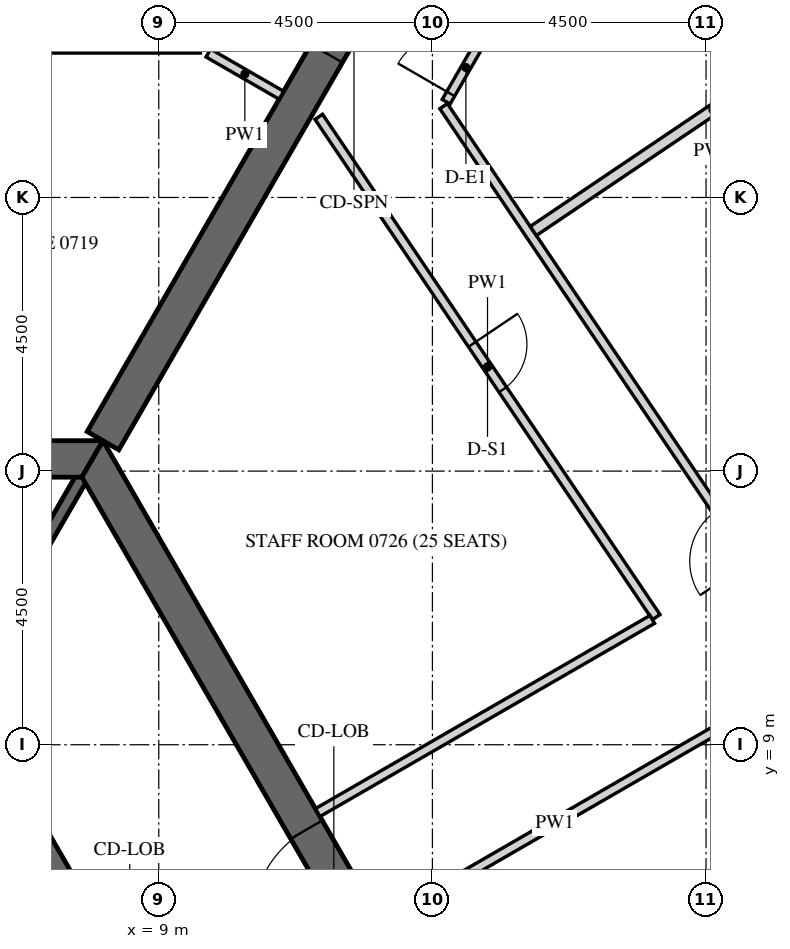
"""IFC4 building model, lengths in metres.
Left out: names, types, materials, properties, quantities, classifications, styles, units other than length and angle.
Written with IfcOpenShell. Run it as: python <this file> out.ifc"""

import sys

from ifc_helpers import new_model, si_unit, direction, frame, frame_2d, origin, place, context, subcontext, project, spatial, polyline, rectangle, outline, extrude, element, fill, save


model = new_model("IFC4")
c1 = context("Model", 3, precision=1e-05, world=origin(), true_north=direction((0.0, 1.0)))
c2 = subcontext(c1, "Body", "Model", "MODEL_VIEW")
j1 = project(units=[si_unit("LENGTHUNIT", "METRE"), si_unit("PLANEANGLEUNIT", "RADIAN")], contexts=[c1])
p1 = place(None, origin())
s1 = spatial("IfcSite", under=j1, at=p1, CompositionType="ELEMENT")
p2 = place(p1, origin())
s2 = spatial("IfcBuilding", under=s1, at=p2, CompositionType="ELEMENT")
p3 = place(p2, frame((0.0, 0.0, 99.9)))
s3 = spatial("IfcBuildingStorey", under=s2, at=p3, CompositionType="ELEMENT", Elevation=99.9)
p4 = place(p3, frame((33.728, 3.153, -0.15), z_axis=(0.0, 0.0, 1.0), x_axis=(-0.559192411416, 0.82903790445, 0.0)))
e1 = element("IfcWall", 1, at=p4, inside=s3, PredefinedType="SOLIDWALL", context=c2, shape_type="SweptSolid", body=[
    extrude(outline(polyline([(-0.026, -0.275), (30.093, -0.275), (30.048, 0.275), (0.026, 0.275), (-0.026, -0.275)])), origin(), (0.0, 0.0, 1.0), 3.9),
])
p5 = place(p4, frame((1.236, 0.0, 1.05)))
e2 = element("IfcOpeningElement", 2, at=p5, cuts=e1, PredefinedType="OPENING", context=c2, shape_type="SweptSolid", body=[
    extrude(rectangle(XDim=2.4, YDim=2.4, at=frame_2d((1.2, 1.2))), frame((0.0, 0.285, 0.0), z_axis=(0.0, -1.0, 0.0), x_axis=(1.0, 0.0, 0.0)), (0.0, 0.0, 1.0), 0.57),
])
p6 = place(p4, frame((4.835, 0.0, 1.05)))
e3 = element("IfcOpeningElement", 3, at=p6, cuts=e1, PredefinedType="OPENING", context=c2, shape_type="SweptSolid", body=[
    extrude(rectangle(XDim=2.4, YDim=2.4, at=frame_2d((1.2, 1.2))), frame((0.0, 0.285, 0.0), z_axis=(0.0, -1.0, 0.0), x_axis=(1.0, 0.0, 0.0)), (0.0, 0.0, 1.0), 0.57),
])
p7 = place(p4, frame((8.436, 0.0, 1.05)))
e4 = element("IfcOpeningElement", 4, at=p7, cuts=e1, PredefinedType="OPENING", context=c2, shape_type="SweptSolid", body=[
    extrude(rectangle(XDim=2.4, YDim=2.4, at=frame_2d((1.2, 1.2))), frame((0.0, 0.285, 0.0), z_axis=(0.0, -1.0, 0.0), x_axis=(1.0, 0.0, 0.0)), (0.0, 0.0, 1.0), 0.57),
])
p8 = place(p4, frame((12.035, 0.0, 1.05)))
e5 = element("IfcOpeningElement", 5, at=p8, cuts=e1, PredefinedType="OPENING", context=c2, shape_type="SweptSolid", body=[
    extrude(rectangle(XDim=2.4, YDim=2.4, at=frame_2d((1.2, 1.2))), frame((0.0, 0.285, 0.0), z_axis=(0.0, -1.0, 0.0), x_axis=(1.0, 0.0, 0.0)), (0.0, 0.0, 1.0), 0.57),
])
p9 = place(p4, frame((15.635, 0.0, 1.05)))
e6 = element("IfcOpeningElement", 6, at=p9, cuts=e1, PredefinedType="OPENING", context=c2, shape_type="SweptSolid", body=[
    extrude(rectangle(XDim=2.4, YDim=2.4, at=frame_2d((1.2, 1.2))), frame((0.0, 0.285, 0.0), z_axis=(0.0, -1.0, 0.0), x_axis=(1.0, 0.0, 0.0)), (0.0, 0.0, 1.0), 0.57),
])
p10 = place(p4, frame((19.236, 0.0, 1.05)))
e7 = element("IfcOpeningElement", 7, at=p10, cuts=e1, PredefinedType="OPENING", context=c2, shape_type="SweptSolid", body=[
    extrude(rectangle(XDim=2.4, YDim=2.4, at=frame_2d((1.2, 1.2))), frame((0.0, 0.285, 0.0), z_axis=(0.0, -1.0, 0.0), x_axis=(1.0, 0.0, 0.0)), (0.0, 0.0, 1.0), 0.57),
])
p11 = place(p4, frame((22.835, 0.0, 1.05)))
e8 = element("IfcOpeningElement", 8, at=p11, cuts=e1, PredefinedType="OPENING", context=c2, shape_type="SweptSolid", body=[
    extrude(rectangle(XDim=2.4, YDim=2.4, at=frame_2d((1.2, 1.2))), frame((0.0, 0.285, 0.0), z_axis=(0.0, -1.0, 0.0), x_axis=(1.0, 0.0, 0.0)), (0.0, 0.0, 1.0), 0.57),
])
p12 = place(p4, frame((26.436, 0.0, 1.05)))
e9 = element("IfcOpeningElement", 9, at=p12, cuts=e1, PredefinedType="OPENING", context=c2, shape_type="SweptSolid", body=[
    extrude(rectangle(XDim=2.4, YDim=2.4, at=frame_2d((1.2, 1.2))), frame((0.0, 0.285, 0.0), z_axis=(0.0, -1.0, 0.0), x_axis=(1.0, 0.0, 0.0)), (0.0, 0.0, 1.0), 0.57),
])
p13 = place(p3, frame((15.819, 0.0, -0.15), z_axis=(0.0, 0.0, 1.0), x_axis=(-0.499999880136, 0.866025472988, 0.0)))
e10 = element("IfcWall", 10, at=p13, inside=s3, PredefinedType="SHEAR", context=c2, shape_type="SweptSolid", body=[
    extrude(outline(polyline([(-0.173, -0.3), (15.993, -0.3), (15.646, 0.3), (0.173, 0.3), (-0.173, -0.3)])), origin(), (0.0, 0.0, 1.0), 3.9),
])
p14 = place(p13, frame((6.981, 0.0, 0.15)))
e11 = element("IfcOpeningElement", 11, at=p14, cuts=e10, PredefinedType="OPENING", context=c2, shape_type="SweptSolid", body=[
    extrude(rectangle(XDim=1.8, YDim=2.4, at=frame_2d((0.9, 1.2))), frame((0.0, 0.31, 0.0), z_axis=(0.0, -1.0, 0.0), x_axis=(1.0, 0.0, 0.0)), (0.0, 0.0, 1.0), 0.62),
])
p15 = place(p3, frame((7.91, 13.7, -0.15), z_axis=(0.0, 0.0, 1.0), x_axis=(-1.0, 0.0, 0.0)))
e12 = element("IfcWall", 12, at=p15, inside=s3, PredefinedType="SHEAR", context=c2, shape_type="SweptSolid", body=[
    extrude(outline(polyline([(-0.173, -0.3), (15.993, -0.3), (15.646, 0.3), (0.173, 0.3), (-0.173, -0.3)])), origin(), (0.0, 0.0, 1.0), 3.9),
])
p16 = place(p15, frame((7.31, 0.0, 0.15)))
e13 = element("IfcOpeningElement", 13, at=p16, cuts=e12, PredefinedType="OPENING", context=c2, shape_type="SweptSolid", body=[
    extrude(rectangle(XDim=1.2, YDim=2.4, at=frame_2d((0.6, 1.2))), frame((0.0, 0.31, 0.0), z_axis=(0.0, -1.0, 0.0), x_axis=(1.0, 0.0, 0.0)), (0.0, 0.0, 1.0), 0.62),
])
p17 = place(p3, frame((8.083, 14.0, -0.15), z_axis=(0.0, 0.0, 1.0), x_axis=(0.499997680643, 0.866026742862, 0.0)))
e14 = element("IfcWall", 14, at=p17, inside=s3, PredefinedType="SHEAR", context=c2, shape_type="SweptSolid", body=[
    extrude(rectangle(XDim=16.509, YDim=0.6, at=frame_2d((8.254, 0.0))), origin(), (0.0, 0.0, 1.0), 3.9),
])
p18 = place(p17, frame((7.354, 0.0, 0.15)))
e15 = element("IfcOpeningElement", 15, at=p18, cuts=e14, PredefinedType="OPENING", context=c2, shape_type="SweptSolid", body=[
    extrude(rectangle(XDim=1.8, YDim=2.4, at=frame_2d((0.9, 1.2))), frame((0.0, 0.31, 0.0), z_axis=(0.0, -1.0, 0.0), x_axis=(1.0, 0.0, 0.0)), (0.0, 0.0, 1.0), 0.62),
])
p19 = place(p3, frame((11.345, 0.0, -0.15), z_axis=(0.0, 0.0, 1.0), x_axis=(-0.499995046907, 0.866028263435, 0.0)))
e16 = element("IfcWall", 16, at=p19, inside=s3, PredefinedType="SHEAR", context=c2, shape_type="SweptSolid", body=[
    extrude(outline(polyline([(-0.101, -0.175), (11.446, -0.175), (11.244, 0.175), (0.101, 0.175), (-0.101, -0.175)])), origin(), (0.0, 0.0, 1.0), 3.9),
])
p20 = place(p19, frame((4.744, 0.0, 0.15)))
e17 = element("IfcOpeningElement", 17, at=p20, cuts=e16, PredefinedType="OPENING", context=c2, shape_type="SweptSolid", body=[
    extrude(rectangle(XDim=1.8, YDim=2.4, at=frame_2d((0.9, 1.2))), frame((0.0, 0.185, 0.0), z_axis=(0.0, -1.0, 0.0), x_axis=(1.0, 0.0, 0.0)), (0.0, 0.0, 1.0), 0.37),
])
p21 = place(p3, frame((5.773, 10.0, -0.15), z_axis=(0.0, 0.0, 1.0), x_axis=(0.500038251005, 0.86600331843, 0.0)))
e18 = element("IfcWall", 18, at=p21, inside=s3, PredefinedType="SHEAR", context=c2, shape_type="SweptSolid", body=[
    extrude(rectangle(XDim=3.926, YDim=0.2, at=frame_2d((1.963, 0.0))), origin(), (0.0, 0.0, 1.0), 3.9),
])
p22 = place(p3, frame((0.825, 20.45, 0.0), z_axis=(0.0, 0.0, 1.0), x_axis=(1.0, 0.0, 0.0)))
e19 = element("IfcWall", 19, at=p22, inside=s3, PredefinedType="PARTITIONING", context=c2, shape_type="SweptSolid", body=[
    extrude(rectangle(XDim=8.86, YDim=0.15, at=frame_2d((4.43, 0.0))), origin(), (0.0, 0.0, 1.0), 2.988),
])
p23 = place(p22, frame((3.98, 0.0, 0.0)))
e20 = element("IfcOpeningElement", 20, at=p23, cuts=e19, PredefinedType="OPENING", context=c2, shape_type="SweptSolid", body=[
    extrude(rectangle(XDim=0.9, YDim=2.1, at=frame_2d((0.45, 1.05))), frame((0.0, 0.085, 0.0), z_axis=(0.0, -1.0, 0.0), x_axis=(1.0, 0.0, 0.0)), (0.0, 0.0, 1.0), 0.17),
])
p24 = place(p3, frame((9.815, 20.375, 0.0), z_axis=(0.0, 0.0, 1.0), x_axis=(0.86600392025, -0.500037208726, 0.0)))
e21 = element("IfcWall", 21, at=p24, inside=s3, PredefinedType="PARTITIONING", context=c2, shape_type="SweptSolid", body=[
    extrude(rectangle(XDim=1.388, YDim=0.15, at=frame_2d((0.694, 0.0))), origin(), (0.0, 0.0, 1.0), 2.988),
])
p25 = place(p3, frame((26.174, 0.985, 0.0), z_axis=(0.0, 0.0, 1.0), x_axis=(-0.559192163771, 0.829038071488, 0.0)))
e22 = element("IfcWall", 22, at=p25, inside=s3, PredefinedType="PARTITIONING", context=c2, shape_type="SweptSolid", body=[
    extrude(rectangle(XDim=22.335, YDim=0.15, at=frame_2d((11.168, 0.0))), origin(), (0.0, 0.0, 1.0), 2.988),
])
p26 = place(p25, frame((3.463, 0.0, 0.0)))
e23 = element("IfcOpeningElement", 23, at=p26, cuts=e22, PredefinedType="OPENING", context=c2, shape_type="SweptSolid", body=[
    extrude(rectangle(XDim=1.0, YDim=2.1, at=frame_2d((0.5, 1.05))), frame((0.0, 0.085, 0.0), z_axis=(0.0, -1.0, 0.0), x_axis=(1.0, 0.0, 0.0)), (0.0, 0.0, 1.0), 0.17),
])
p27 = place(p25, frame((13.309, 0.0, 0.0)))
e24 = element("IfcOpeningElement", 24, at=p27, cuts=e22, PredefinedType="OPENING", context=c2, shape_type="SweptSolid", body=[
    extrude(rectangle(XDim=1.0, YDim=2.1, at=frame_2d((0.5, 1.05))), frame((0.0, 0.085, 0.0), z_axis=(0.0, -1.0, 0.0), x_axis=(1.0, 0.0, 0.0)), (0.0, 0.0, 1.0), 0.17),
])
p28 = place(p3, frame((13.726, 19.574, 0.0), z_axis=(0.0, 0.0, 1.0), x_axis=(0.499951531933, 0.866053385028, 0.0)))
e25 = element("IfcWall", 25, at=p28, inside=s3, PredefinedType="PARTITIONING", context=c2, shape_type="SweptSolid", body=[
    extrude(rectangle(XDim=3.506, YDim=0.15, at=frame_2d((1.753, 0.0))), origin(), (0.0, 0.0, 1.0), 2.988),
])
p29 = place(p28, frame((0.15, 0.0, 0.0)))
e26 = element("IfcOpeningElement", 26, at=p29, cuts=e25, PredefinedType="OPENING", context=c2, shape_type="SweptSolid", body=[
    extrude(rectangle(XDim=1.0, YDim=2.1, at=frame_2d((0.5, 1.05))), frame((0.0, 0.085, 0.0), z_axis=(0.0, -1.0, 0.0), x_axis=(1.0, 0.0, 0.0)), (0.0, 0.0, 1.0), 0.17),
])
p30 = place(p3, frame((12.664, 6.066, 0.0), z_axis=(0.0, 0.0, 1.0), x_axis=(0.866027295802, 0.499996722915, 0.0)))
e27 = element("IfcWall", 27, at=p30, inside=s3, PredefinedType="PARTITIONING", context=c2, shape_type="SweptSolid", body=[
    extrude(rectangle(XDim=6.575, YDim=0.15, at=frame_2d((3.288, 0.0))), origin(), (0.0, 0.0, 1.0), 2.988),
])
p31 = place(p3, frame((11.632, 19.326, 0.0), z_axis=(0.0, 0.0, 1.0), x_axis=(0.559193968377, -0.829036854266, 0.0)))
e28 = element("IfcWall", 28, at=p31, inside=s3, PredefinedType="PARTITIONING", context=c2, shape_type="SweptSolid", body=[
    extrude(rectangle(XDim=9.924, YDim=0.15, at=frame_2d((4.962, 0.0))), origin(), (0.0, 0.0, 1.0), 2.988),
])
p32 = place(p31, frame((4.512, 0.0, 0.0)))
e29 = element("IfcOpeningElement", 29, at=p32, cuts=e28, PredefinedType="OPENING", context=c2, shape_type="SweptSolid", body=[
    extrude(rectangle(XDim=0.9, YDim=2.1, at=frame_2d((0.45, 1.05))), frame((0.0, 0.085, 0.0), z_axis=(0.0, -1.0, 0.0), x_axis=(1.0, 0.0, 0.0)), (0.0, 0.0, 1.0), 0.17),
])
p33 = place(p3, frame((17.116, 11.061, 0.0), z_axis=(0.0, 0.0, 1.0), x_axis=(-0.866021127751, -0.500007406234, 0.0)))
e30 = element("IfcWall", 30, at=p33, inside=s3, PredefinedType="PARTITIONING", context=c2, shape_type="SweptSolid", body=[
    extrude(rectangle(XDim=6.354, YDim=0.15, at=frame_2d((3.177, 0.0))), origin(), (0.0, 0.0, 1.0), 2.988),
])
p34 = place(p3, frame((21.066, 21.433, 0.0), z_axis=(0.0, 0.0, 1.0), x_axis=(-0.829022625118, -0.559215063318, 0.0)))
e31 = element("IfcWall", 31, at=p34, inside=s3, PredefinedType="PARTITIONING", context=c2, shape_type="SweptSolid", body=[
    extrude(rectangle(XDim=7.125, YDim=0.18, at=frame_2d((3.562, 0.0))), origin(), (0.0, 0.0, 1.0), 2.988),
])
p35 = place(p14, origin())
e32 = element("IfcDoor", 32, at=p35, inside=s3, OperationType="DOUBLE_DOOR_SINGLE_SWING", PredefinedType="DOOR", context=c2, shape_type="SweptSolid", body=[
    extrude(rectangle(XDim=1.8, YDim=2.4, at=frame_2d((0.9, 1.2))), frame((0.0, 0.025, 0.0), z_axis=(0.0, -1.0, 0.0), x_axis=(1.0, 0.0, 0.0)), (0.0, 0.0, 1.0), 0.05),
])
fill(e11, e32)
p36 = place(p18, origin())
e33 = element("IfcDoor", 33, at=p36, inside=s3, OperationType="DOUBLE_DOOR_SINGLE_SWING", PredefinedType="DOOR", context=c2, shape_type="SweptSolid", body=[
    extrude(rectangle(XDim=1.8, YDim=2.4, at=frame_2d((0.9, 1.2))), frame((0.0, 0.025, 0.0), z_axis=(0.0, -1.0, 0.0), x_axis=(1.0, 0.0, 0.0)), (0.0, 0.0, 1.0), 0.05),
])
fill(e15, e33)
p37 = place(p29, origin())
e34 = element("IfcDoor", 34, at=p37, inside=s3, OperationType="SINGLE_SWING_RIGHT", PredefinedType="DOOR", context=c2, shape_type="SweptSolid", body=[
    extrude(rectangle(XDim=1.0, YDim=2.1, at=frame_2d((0.5, 1.05))), frame((0.0, 0.025, 0.0), z_axis=(0.0, -1.0, 0.0), x_axis=(1.0, 0.0, 0.0)), (0.0, 0.0, 1.0), 0.05),
])
fill(e26, e34)
p38 = place(p32, origin())
e35 = element("IfcDoor", 35, at=p38, inside=s3, OperationType="SINGLE_SWING_LEFT", PredefinedType="DOOR", context=c2, shape_type="SweptSolid", body=[
    extrude(rectangle(XDim=0.9, YDim=2.1, at=frame_2d((0.45, 1.05))), frame((0.0, 0.025, 0.0), z_axis=(0.0, -1.0, 0.0), x_axis=(1.0, 0.0, 0.0)), (0.0, 0.0, 1.0), 0.05),
])
fill(e29, e35)
save(model, sys.argv[1])
